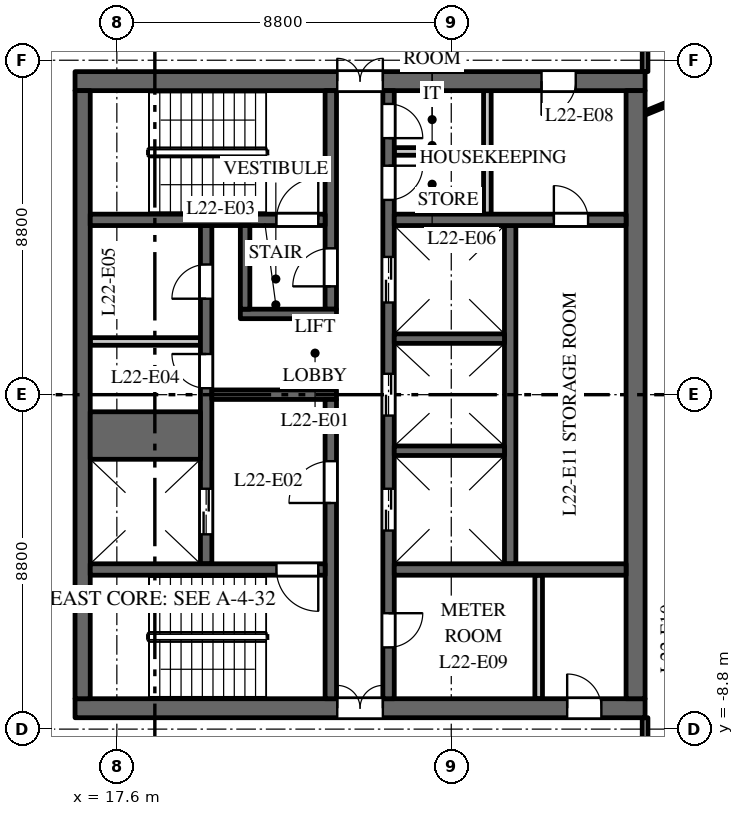
"""IFC4 building model, lengths in metres.
Left out: names, types, materials, properties, quantities, classifications, styles, units other than length and angle.
Written with IfcOpenShell. Run it as: python <this file> out.ifc"""

import sys

from ifc_helpers import new_model, si_unit, direction, frame, frame_2d, origin, place, context, subcontext, project, spatial, rectangle, extrude, element, fill, save


model = new_model("IFC4")
c1 = context("Model", 3, precision=1e-05, world=origin(), true_north=direction((0.0, 1.0)))
c2 = subcontext(c1, "Body", "Model", "MODEL_VIEW")
j1 = project(units=[si_unit("LENGTHUNIT", "METRE"), si_unit("PLANEANGLEUNIT", "RADIAN")], contexts=[c1])
p1 = place(None, origin())
s1 = spatial("IfcSite", under=j1, at=p1, CompositionType="ELEMENT")
p2 = place(p1, origin())
s2 = spatial("IfcBuilding", under=s1, at=p2, CompositionType="ELEMENT")
p3 = place(p2, frame((0.0, 0.0, 100.0)))
s3 = spatial("IfcBuildingStorey", under=s2, at=p3, CompositionType="ELEMENT", Elevation=100.0)
p4 = place(p3, frame((16.5, 8.25, 0.0), z_axis=(0.0, 0.0, 1.0), x_axis=(1.0, 0.0, 0.0)))
e1 = element("IfcWall", 1, at=p4, inside=s3, PredefinedType="SHEAR", context=c2, shape_type="SweptSolid", body=[
    extrude(rectangle(XDim=15.0, YDim=0.5, at=frame_2d((7.5, 0.0))), origin(), (0.0, 0.0, 1.0), 3.7),
])
p5 = place(p4, frame((6.9, 0.0, 0.0)))
e2 = element("IfcOpeningElement", 2, at=p5, cuts=e1, PredefinedType="OPENING", context=c2, shape_type="SweptSolid", body=[
    extrude(rectangle(XDim=1.2, YDim=2.1, at=frame_2d((0.6, 1.05))), frame((0.0, 0.26, 0.0), z_axis=(0.0, -1.0, 0.0), x_axis=(1.0, 0.0, 0.0)), (0.0, 0.0, 1.0), 0.52),
])
p6 = place(p4, frame((12.275, 0.0, 0.0)))
e3 = element("IfcOpeningElement", 3, at=p6, cuts=e1, PredefinedType="OPENING", context=c2, shape_type="SweptSolid", body=[
    extrude(rectangle(XDim=0.9, YDim=2.1, at=frame_2d((0.45, 1.05))), frame((0.0, 0.26, 0.0), z_axis=(0.0, -1.0, 0.0), x_axis=(1.0, 0.0, 0.0)), (0.0, 0.0, 1.0), 0.52),
])
p7 = place(p3, frame((16.5, -8.25, 0.0), z_axis=(0.0, 0.0, 1.0), x_axis=(1.0, 0.0, 0.0)))
e4 = element("IfcWall", 4, at=p7, inside=s3, PredefinedType="SHEAR", context=c2, shape_type="SweptSolid", body=[
    extrude(rectangle(XDim=15.0, YDim=0.5, at=frame_2d((7.5, 0.0))), origin(), (0.0, 0.0, 1.0), 3.7),
])
p8 = place(p7, frame((6.9, 0.0, 0.0)))
e5 = element("IfcOpeningElement", 5, at=p8, cuts=e4, PredefinedType="OPENING", context=c2, shape_type="SweptSolid", body=[
    extrude(rectangle(XDim=1.2, YDim=2.1, at=frame_2d((0.6, 1.05))), frame((0.0, 0.26, 0.0), z_axis=(0.0, -1.0, 0.0), x_axis=(1.0, 0.0, 0.0)), (0.0, 0.0, 1.0), 0.52),
])
p9 = place(p7, frame((12.95, 0.0, 0.0)))
e6 = element("IfcOpeningElement", 6, at=p9, cuts=e4, PredefinedType="OPENING", context=c2, shape_type="SweptSolid", body=[
    extrude(rectangle(XDim=0.9, YDim=2.1, at=frame_2d((0.45, 1.05))), frame((0.0, 0.26, 0.0), z_axis=(0.0, -1.0, 0.0), x_axis=(1.0, 0.0, 0.0)), (0.0, 0.0, 1.0), 0.52),
])
p10 = place(p3, frame((16.9, 1.4, 0.0), z_axis=(0.0, 0.0, 1.0), x_axis=(1.0, 0.0, 0.0)))
e7 = element("IfcWall", 7, at=p10, inside=s3, PredefinedType="PARTITIONING", context=c2, shape_type="SweptSolid", body=[
    extrude(rectangle(XDim=2.9, YDim=0.2, at=frame_2d((1.45, 0.0))), origin(), (0.0, 0.0, 1.0), 3.7),
])
p11 = place(p3, frame((27.95, -4.45, 0.0), z_axis=(0.0, 0.0, 1.0), x_axis=(0.0, 1.0, 0.0)))
e8 = element("IfcWall", 8, at=p11, inside=s3, PredefinedType="SHEAR", context=c2, shape_type="SweptSolid", body=[
    extrude(rectangle(XDim=8.9, YDim=0.3, at=frame_2d((4.45, 0.0))), origin(), (0.0, 0.0, 1.0), 3.7),
])
p12 = place(p3, frame((19.95, -4.45, 0.0), z_axis=(0.0, 0.0, 1.0), x_axis=(0.0, 1.0, 0.0)))
e9 = element("IfcWall", 9, at=p12, inside=s3, PredefinedType="SHEAR", context=c2, shape_type="SweptSolid", body=[
    extrude(rectangle(XDim=8.9, YDim=0.3, at=frame_2d((4.45, 0.0))), origin(), (0.0, 0.0, 1.0), 3.7),
])
p13 = place(p12, frame((0.775, 0.0, 0.0)))
e10 = element("IfcOpeningElement", 10, at=p13, cuts=e9, PredefinedType="OPENING", context=c2, shape_type="SweptSolid", body=[
    extrude(rectangle(XDim=1.2, YDim=2.1, at=frame_2d((0.6, 1.05))), frame((0.0, 0.16, 0.0), z_axis=(0.0, -1.0, 0.0), x_axis=(1.0, 0.0, 0.0)), (0.0, 0.0, 1.0), 0.32),
])
p14 = place(p12, frame((4.62, 0.0, 0.0)))
e11 = element("IfcOpeningElement", 11, at=p14, cuts=e9, PredefinedType="OPENING", context=c2, shape_type="SweptSolid", body=[
    extrude(rectangle(XDim=0.9, YDim=2.1, at=frame_2d((0.45, 1.05))), frame((0.0, 0.16, 0.0), z_axis=(0.0, -1.0, 0.0), x_axis=(1.0, 0.0, 0.0)), (0.0, 0.0, 1.0), 0.32),
])
p15 = place(p12, frame((6.975, 0.0, 0.0)))
e12 = element("IfcOpeningElement", 12, at=p15, cuts=e9, PredefinedType="OPENING", context=c2, shape_type="SweptSolid", body=[
    extrude(rectangle(XDim=0.9, YDim=2.1, at=frame_2d((0.45, 1.05))), frame((0.0, 0.16, 0.0), z_axis=(0.0, -1.0, 0.0), x_axis=(1.0, 0.0, 0.0)), (0.0, 0.0, 1.0), 0.32),
])
p16 = place(p3, frame((24.75, -8.0, 0.0), z_axis=(0.0, 0.0, 1.0), x_axis=(0.0, 1.0, 0.0)))
e13 = element("IfcWall", 13, at=p16, inside=s3, PredefinedType="SHEAR", context=c2, shape_type="SweptSolid", body=[
    extrude(rectangle(XDim=16.0, YDim=0.3, at=frame_2d((8.0, 0.0))), origin(), (0.0, 0.0, 1.0), 3.7),
])
p17 = place(p16, frame((4.425, 0.0, 0.0)))
e14 = element("IfcOpeningElement", 14, at=p17, cuts=e13, PredefinedType="OPENING", context=c2, shape_type="SweptSolid", body=[
    extrude(rectangle(XDim=1.1, YDim=2.1, at=frame_2d((0.55, 1.05))), frame((0.0, 0.16, 0.0), z_axis=(0.0, -1.0, 0.0), x_axis=(1.0, 0.0, 0.0)), (0.0, 0.0, 1.0), 0.32),
])
p18 = place(p16, frame((7.45, 0.0, 0.0)))
e15 = element("IfcOpeningElement", 15, at=p18, cuts=e13, PredefinedType="OPENING", context=c2, shape_type="SweptSolid", body=[
    extrude(rectangle(XDim=1.1, YDim=2.1, at=frame_2d((0.55, 1.05))), frame((0.0, 0.16, 0.0), z_axis=(0.0, -1.0, 0.0), x_axis=(1.0, 0.0, 0.0)), (0.0, 0.0, 1.0), 0.32),
])
p19 = place(p16, frame((10.425, 0.0, 0.0)))
e16 = element("IfcOpeningElement", 16, at=p19, cuts=e13, PredefinedType="OPENING", context=c2, shape_type="SweptSolid", body=[
    extrude(rectangle(XDim=1.2, YDim=2.1, at=frame_2d((0.6, 1.05))), frame((0.0, 0.16, 0.0), z_axis=(0.0, -1.0, 0.0), x_axis=(1.0, 0.0, 0.0)), (0.0, 0.0, 1.0), 0.32),
])
p20 = place(p16, frame((13.125, 0.0, 0.0)))
e17 = element("IfcOpeningElement", 17, at=p20, cuts=e13, PredefinedType="OPENING", context=c2, shape_type="SweptSolid", body=[
    extrude(rectangle(XDim=0.9, YDim=2.1, at=frame_2d((0.45, 1.05))), frame((0.0, 0.16, 0.0), z_axis=(0.0, -1.0, 0.0), x_axis=(1.0, 0.0, 0.0)), (0.0, 0.0, 1.0), 0.32),
])
p21 = place(p16, frame((14.75, 0.0, 0.0)))
e18 = element("IfcOpeningElement", 18, at=p21, cuts=e13, PredefinedType="OPENING", context=c2, shape_type="SweptSolid", body=[
    extrude(rectangle(XDim=0.9, YDim=2.1, at=frame_2d((0.45, 1.05))), frame((0.0, 0.16, 0.0), z_axis=(0.0, -1.0, 0.0), x_axis=(1.0, 0.0, 0.0)), (0.0, 0.0, 1.0), 0.32),
])
p22 = place(p16, frame((1.35, 0.0, 0.0)))
e19 = element("IfcOpeningElement", 19, at=p22, cuts=e13, PredefinedType="OPENING", context=c2, shape_type="SweptSolid", body=[
    extrude(rectangle(XDim=0.9, YDim=2.1, at=frame_2d((0.45, 1.05))), frame((0.0, 0.16, 0.0), z_axis=(0.0, -1.0, 0.0), x_axis=(1.0, 0.0, 0.0)), (0.0, 0.0, 1.0), 0.32),
])
p23 = place(p3, frame((20.1, 0.0, 0.0), z_axis=(0.0, 0.0, 1.0), x_axis=(1.0, 0.0, 0.0)))
e20 = element("IfcWall", 20, at=p23, inside=s3, PredefinedType="SHEAR", context=c2, shape_type="SweptSolid", body=[
    extrude(rectangle(XDim=3.28, YDim=0.25, at=frame_2d((1.64, 0.0))), origin(), (0.0, 0.0, 1.0), 3.7),
])
p24 = place(p3, frame((16.7, -8.0, 0.0), z_axis=(0.0, 0.0, 1.0), x_axis=(0.0, 1.0, 0.0)))
e21 = element("IfcWall", 21, at=p24, inside=s3, PredefinedType="SHEAR", context=c2, shape_type="SweptSolid", body=[
    extrude(rectangle(XDim=16.0, YDim=0.4, at=frame_2d((8.0, 0.0))), origin(), (0.0, 0.0, 1.0), 3.7),
])
p25 = place(p3, frame((31.25, -8.0, 0.0), z_axis=(0.0, 0.0, 1.0), x_axis=(0.0, 1.0, 0.0)))
e22 = element("IfcWall", 22, at=p25, inside=s3, PredefinedType="SHEAR", context=c2, shape_type="SweptSolid", body=[
    extrude(rectangle(XDim=16.0, YDim=0.5, at=frame_2d((8.0, 0.0))), origin(), (0.0, 0.0, 1.0), 3.7),
])
p26 = place(p3, frame((24.9, 4.6, 0.0), z_axis=(0.0, 0.0, 1.0), x_axis=(1.0, 0.0, 0.0)))
e23 = element("IfcWall", 23, at=p26, inside=s3, PredefinedType="SHEAR", context=c2, shape_type="SweptSolid", body=[
    extrude(rectangle(XDim=6.1, YDim=0.3, at=frame_2d((3.05, 0.0))), origin(), (0.0, 0.0, 1.0), 3.7),
])
p27 = place(p26, frame((4.2, 0.0, 0.0)))
e24 = element("IfcOpeningElement", 24, at=p27, cuts=e23, PredefinedType="OPENING", context=c2, shape_type="SweptSolid", body=[
    extrude(rectangle(XDim=0.9, YDim=2.1, at=frame_2d((0.45, 1.05))), frame((0.0, 0.16, 0.0), z_axis=(0.0, -1.0, 0.0), x_axis=(1.0, 0.0, 0.0)), (0.0, 0.0, 1.0), 0.32),
])
for number, where, z_axis, x_axis in (
    (25, (27.35, 4.75, 0.0), (0.0, 0.0, 1.0), (0.0, 1.0, 0.0)),
    (26, (28.7, -8.0, 0.0), (0.0, 0.0, 1.0), (0.0, 1.0, 0.0)),
):
    element("IfcWall", number, at=place(p3, frame(where, z_axis=z_axis, x_axis=x_axis)), inside=s3, PredefinedType="PARTITIONING", context=c2, shape_type="SweptSolid", body=[
        extrude(rectangle(XDim=3.25, YDim=0.2, at=frame_2d((1.625, 0.0))), origin(), (0.0, 0.0, 1.0), 3.7),
    ])
p28 = place(p3, frame((24.9, 6.4, 0.0), z_axis=(0.0, 0.0, 1.0), x_axis=(1.0, 0.0, 0.0)))
e27 = element("IfcWall", 27, at=p28, inside=s3, PredefinedType="PARTITIONING", context=c2, shape_type="SweptSolid", body=[
    extrude(rectangle(XDim=2.35, YDim=0.2, at=frame_2d((1.175, 0.0))), origin(), (0.0, 0.0, 1.0), 3.7),
])
p29 = place(p3, frame((24.9, -4.6, 0.0), z_axis=(0.0, 0.0, 1.0), x_axis=(1.0, 0.0, 0.0)))
e28 = element("IfcWall", 28, at=p29, inside=s3, PredefinedType="SHEAR", context=c2, shape_type="SweptSolid", body=[
    extrude(rectangle(XDim=6.1, YDim=0.3, at=frame_2d((3.05, 0.0))), origin(), (0.0, 0.0, 1.0), 3.7),
])
p30 = place(p3, frame((16.9, -1.075, 0.0), z_axis=(0.0, 0.0, 1.0), x_axis=(1.0, 0.0, 0.0)))
e29 = element("IfcWall", 29, at=p30, inside=s3, PredefinedType="SHEAR", context=c2, shape_type="SweptSolid", body=[
    extrude(rectangle(XDim=2.9, YDim=1.25, at=frame_2d((1.45, 0.0))), origin(), (0.0, 0.0, 1.0), 3.7),
])
for number, where, z_axis, x_axis in (
    (30, (24.9, -1.475, 0.0), (0.0, 0.0, 1.0), (1.0, 0.0, 0.0)),
    (31, (24.9, 1.475, 0.0), (0.0, 0.0, 1.0), (1.0, 0.0, 0.0)),
):
    element("IfcWall", number, at=place(p3, frame(where, z_axis=z_axis, x_axis=x_axis)), inside=s3, PredefinedType="SHEAR", context=c2, shape_type="SweptSolid", body=[
        extrude(rectangle(XDim=2.9, YDim=0.25, at=frame_2d((1.45, 0.0))), origin(), (0.0, 0.0, 1.0), 3.7),
    ])
p31 = place(p3, frame((23.23, 2.25, 0.0), z_axis=(0.0, 0.0, 1.0), x_axis=(0.0, 1.0, 0.0)))
e32 = element("IfcWall", 32, at=p31, inside=s3, PredefinedType="SHEAR", context=c2, shape_type="SweptSolid", body=[
    extrude(rectangle(XDim=5.75, YDim=0.3, at=frame_2d((2.875, 0.0))), origin(), (0.0, 0.0, 1.0), 3.7),
])
p32 = place(p31, frame((0.6, 0.0, 0.0)))
e33 = element("IfcOpeningElement", 33, at=p32, cuts=e32, PredefinedType="OPENING", context=c2, shape_type="SweptSolid", body=[
    extrude(rectangle(XDim=1.0, YDim=2.1, at=frame_2d((0.5, 1.05))), frame((0.0, 0.16, 0.0), z_axis=(0.0, -1.0, 0.0), x_axis=(1.0, 0.0, 0.0)), (0.0, 0.0, 1.0), 0.32),
])
p33 = place(p3, frame((23.23, -8.0, 0.0), z_axis=(0.0, 0.0, 1.0), x_axis=(0.0, 1.0, 0.0)))
e34 = element("IfcWall", 34, at=p33, inside=s3, PredefinedType="SHEAR", context=c2, shape_type="SweptSolid", body=[
    extrude(rectangle(XDim=7.875, YDim=0.3, at=frame_2d((3.938, 0.0))), origin(), (0.0, 0.0, 1.0), 3.7),
])
p34 = place(p33, frame((5.15, 0.0, 0.0)))
e35 = element("IfcOpeningElement", 35, at=p34, cuts=e34, PredefinedType="OPENING", context=c2, shape_type="SweptSolid", body=[
    extrude(rectangle(XDim=1.1, YDim=2.1, at=frame_2d((0.55, 1.05))), frame((0.0, 0.16, 0.0), z_axis=(0.0, -1.0, 0.0), x_axis=(1.0, 0.0, 0.0)), (0.0, 0.0, 1.0), 0.32),
])
p35 = place(p3, frame((16.9, 4.6, 0.0), z_axis=(0.0, 0.0, 1.0), x_axis=(1.0, 0.0, 0.0)))
e36 = element("IfcWall", 36, at=p35, inside=s3, PredefinedType="SHEAR", context=c2, shape_type="SweptSolid", body=[
    extrude(rectangle(XDim=6.18, YDim=0.3, at=frame_2d((3.09, 0.0))), origin(), (0.0, 0.0, 1.0), 3.7),
])
p36 = place(p35, frame((4.9, 0.0, 0.0)))
e37 = element("IfcOpeningElement", 37, at=p36, cuts=e36, PredefinedType="OPENING", context=c2, shape_type="SweptSolid", body=[
    extrude(rectangle(XDim=1.1, YDim=2.1, at=frame_2d((0.55, 1.05))), frame((0.0, 0.16, 0.0), z_axis=(0.0, -1.0, 0.0), x_axis=(1.0, 0.0, 0.0)), (0.0, 0.0, 1.0), 0.32),
])
p37 = place(p3, frame((16.9, -4.6, 0.0), z_axis=(0.0, 0.0, 1.0), x_axis=(1.0, 0.0, 0.0)))
e38 = element("IfcWall", 38, at=p37, inside=s3, PredefinedType="SHEAR", context=c2, shape_type="SweptSolid", body=[
    extrude(rectangle(XDim=6.18, YDim=0.3, at=frame_2d((3.09, 0.0))), origin(), (0.0, 0.0, 1.0), 3.7),
])
p38 = place(p37, frame((4.9, 0.0, 0.0)))
e39 = element("IfcOpeningElement", 39, at=p38, cuts=e38, PredefinedType="OPENING", context=c2, shape_type="SweptSolid", body=[
    extrude(rectangle(XDim=1.1, YDim=2.1, at=frame_2d((0.55, 1.05))), frame((0.0, 0.16, 0.0), z_axis=(0.0, -1.0, 0.0), x_axis=(1.0, 0.0, 0.0)), (0.0, 0.0, 1.0), 0.32),
])
p39 = place(p3, frame((20.85, 2.125, 0.0), z_axis=(0.0, 0.0, 1.0), x_axis=(1.0, 0.0, 0.0)))
e40 = element("IfcWall", 40, at=p39, inside=s3, PredefinedType="SHEAR", context=c2, shape_type="SweptSolid", body=[
    extrude(rectangle(XDim=2.53, YDim=0.25, at=frame_2d((1.265, 0.0))), origin(), (0.0, 0.0, 1.0), 3.7),
])
p40 = place(p3, frame((20.975, 2.25, 0.0), z_axis=(0.0, 0.0, 1.0), x_axis=(0.0, 1.0, 0.0)))
e41 = element("IfcWall", 41, at=p40, inside=s3, PredefinedType="SHEAR", context=c2, shape_type="SweptSolid", body=[
    extrude(rectangle(XDim=2.2, YDim=0.25, at=frame_2d((1.1, 0.0))), origin(), (0.0, 0.0, 1.0), 3.7),
])
p41 = place(p3, frame((31.5, -10.7, 0.0), z_axis=(0.0, 0.0, 1.0), x_axis=(0.0, 1.0, 0.0)))
e42 = element("IfcWall", 42, at=p41, inside=s3, PredefinedType="PARTITIONING", context=c2, shape_type="SweptSolid", body=[
    extrude(rectangle(XDim=2.2, YDim=0.15, at=frame_2d((1.1, 0.0))), origin(), (0.0, 0.0, 1.0), 2.9),
])
p42 = place(p3, frame((31.5, 7.41, 0.0), z_axis=(0.0, 0.0, 1.0), x_axis=(0.925344112436, 0.379128307542, 0.0)))
e43 = element("IfcWall", 43, at=p42, inside=s3, PredefinedType="PARTITIONING", context=c2, shape_type="SweptSolid", body=[
    extrude(rectangle(XDim=2.954, YDim=0.1, at=frame_2d((1.477, 0.0))), origin(), (0.0, 0.0, 1.0), 3.7),
])
p43 = place(p3, frame((31.5, 8.5, 0.0), z_axis=(0.0, 0.0, 1.0), x_axis=(0.0, 1.0, 0.0)))
e44 = element("IfcWall", 44, at=p43, inside=s3, PredefinedType="PARTITIONING", context=c2, shape_type="SweptSolid", body=[
    extrude(rectangle(XDim=2.2, YDim=0.15, at=frame_2d((1.1, 0.0))), origin(), (0.0, 0.0, 1.0), 2.9),
])
p44 = place(p13, origin())
e45 = element("IfcDoor", 45, at=p44, inside=s3, OperationType="DOUBLE_DOOR_SLIDING", PredefinedType="DOOR", context=c2, shape_type="SweptSolid", body=[
    extrude(rectangle(XDim=1.2, YDim=2.1, at=frame_2d((0.6, 1.05))), frame((0.0, 0.025, 0.0), z_axis=(0.0, -1.0, 0.0), x_axis=(1.0, 0.0, 0.0)), (0.0, 0.0, 1.0), 0.05),
])
fill(e10, e45)
p45 = place(p17, origin())
e46 = element("IfcDoor", 46, at=p45, inside=s3, OperationType="DOUBLE_DOOR_SLIDING", PredefinedType="DOOR", context=c2, shape_type="SweptSolid", body=[
    extrude(rectangle(XDim=1.1, YDim=2.1, at=frame_2d((0.55, 1.05))), frame((0.0, 0.025, 0.0), z_axis=(0.0, -1.0, 0.0), x_axis=(1.0, 0.0, 0.0)), (0.0, 0.0, 1.0), 0.05),
])
fill(e14, e46)
p46 = place(p18, origin())
e47 = element("IfcDoor", 47, at=p46, inside=s3, OperationType="DOUBLE_DOOR_SLIDING", PredefinedType="DOOR", context=c2, shape_type="SweptSolid", body=[
    extrude(rectangle(XDim=1.1, YDim=2.1, at=frame_2d((0.55, 1.05))), frame((0.0, 0.025, 0.0), z_axis=(0.0, -1.0, 0.0), x_axis=(1.0, 0.0, 0.0)), (0.0, 0.0, 1.0), 0.05),
])
fill(e15, e47)
p47 = place(p19, origin())
e48 = element("IfcDoor", 48, at=p47, inside=s3, OperationType="DOUBLE_DOOR_SLIDING", PredefinedType="DOOR", context=c2, shape_type="SweptSolid", body=[
    extrude(rectangle(XDim=1.2, YDim=2.1, at=frame_2d((0.6, 1.05))), frame((0.0, 0.025, 0.0), z_axis=(0.0, -1.0, 0.0), x_axis=(1.0, 0.0, 0.0)), (0.0, 0.0, 1.0), 0.05),
])
fill(e16, e48)
p48 = place(p36, origin())
e49 = element("IfcDoor", 49, at=p48, inside=s3, OperationType="SINGLE_SWING_LEFT", PredefinedType="DOOR", context=c2, shape_type="SweptSolid", body=[
    extrude(rectangle(XDim=1.1, YDim=2.1, at=frame_2d((0.55, 1.05))), frame((0.0, 0.025, 0.0), z_axis=(0.0, -1.0, 0.0), x_axis=(1.0, 0.0, 0.0)), (0.0, 0.0, 1.0), 0.05),
])
fill(e37, e49)
p49 = place(p38, origin())
e50 = element("IfcDoor", 50, at=p49, inside=s3, OperationType="SINGLE_SWING_RIGHT", PredefinedType="DOOR", context=c2, shape_type="SweptSolid", body=[
    extrude(rectangle(XDim=1.1, YDim=2.1, at=frame_2d((0.55, 1.05))), frame((0.0, 0.025, 0.0), z_axis=(0.0, -1.0, 0.0), x_axis=(1.0, 0.0, 0.0)), (0.0, 0.0, 1.0), 0.05),
])
fill(e39, e50)
p50 = place(p34, origin())
e51 = element("IfcDoor", 51, at=p50, inside=s3, OperationType="SINGLE_SWING_RIGHT", PredefinedType="DOOR", context=c2, shape_type="SweptSolid", body=[
    extrude(rectangle(XDim=1.1, YDim=2.1, at=frame_2d((0.55, 1.05))), frame((0.0, 0.025, 0.0), z_axis=(0.0, -1.0, 0.0), x_axis=(1.0, 0.0, 0.0)), (0.0, 0.0, 1.0), 0.05),
])
fill(e35, e51)
p51 = place(p32, origin())
e52 = element("IfcDoor", 52, at=p51, inside=s3, OperationType="SINGLE_SWING_RIGHT", PredefinedType="DOOR", context=c2, shape_type="SweptSolid", body=[
    extrude(rectangle(XDim=1.0, YDim=2.1, at=frame_2d((0.5, 1.05))), frame((0.0, 0.025, 0.0), z_axis=(0.0, -1.0, 0.0), x_axis=(1.0, 0.0, 0.0)), (0.0, 0.0, 1.0), 0.05),
])
fill(e33, e52)
p52 = place(p5, origin())
e53 = element("IfcDoor", 53, at=p52, inside=s3, OperationType="DOUBLE_DOOR_DOUBLE_SWING", PredefinedType="DOOR", context=c2, shape_type="SweptSolid", body=[
    extrude(rectangle(XDim=1.2, YDim=2.1, at=frame_2d((0.6, 1.05))), frame((0.0, 0.025, 0.0), z_axis=(0.0, -1.0, 0.0), x_axis=(1.0, 0.0, 0.0)), (0.0, 0.0, 1.0), 0.05),
])
fill(e2, e53)
p53 = place(p8, origin())
e54 = element("IfcDoor", 54, at=p53, inside=s3, OperationType="DOUBLE_DOOR_DOUBLE_SWING", PredefinedType="DOOR", context=c2, shape_type="SweptSolid", body=[
    extrude(rectangle(XDim=1.2, YDim=2.1, at=frame_2d((0.6, 1.05))), frame((0.0, 0.025, 0.0), z_axis=(0.0, -1.0, 0.0), x_axis=(1.0, 0.0, 0.0)), (0.0, 0.0, 1.0), 0.05),
])
fill(e5, e54)
p54 = place(p14, origin())
e55 = element("IfcDoor", 55, at=p54, inside=s3, OperationType="SINGLE_SWING_LEFT", PredefinedType="DOOR", context=c2, shape_type="SweptSolid", body=[
    extrude(rectangle(XDim=0.9, YDim=2.1, at=frame_2d((0.45, 1.05))), frame((0.0, 0.025, 0.0), z_axis=(0.0, -1.0, 0.0), x_axis=(1.0, 0.0, 0.0)), (0.0, 0.0, 1.0), 0.05),
])
fill(e11, e55)
p55 = place(p15, origin())
e56 = element("IfcDoor", 56, at=p55, inside=s3, OperationType="SINGLE_SWING_RIGHT", PredefinedType="DOOR", context=c2, shape_type="SweptSolid", body=[
    extrude(rectangle(XDim=0.9, YDim=2.1, at=frame_2d((0.45, 1.05))), frame((0.0, 0.025, 0.0), z_axis=(0.0, -1.0, 0.0), x_axis=(1.0, 0.0, 0.0)), (0.0, 0.0, 1.0), 0.05),
])
fill(e12, e56)
p56 = place(p20, origin())
e57 = element("IfcDoor", 57, at=p56, inside=s3, OperationType="SINGLE_SWING_RIGHT", PredefinedType="DOOR", context=c2, shape_type="SweptSolid", body=[
    extrude(rectangle(XDim=0.9, YDim=2.1, at=frame_2d((0.45, 1.05))), frame((0.0, 0.025, 0.0), z_axis=(0.0, -1.0, 0.0), x_axis=(1.0, 0.0, 0.0)), (0.0, 0.0, 1.0), 0.05),
])
fill(e17, e57)
p57 = place(p21, origin())
e58 = element("IfcDoor", 58, at=p57, inside=s3, OperationType="SINGLE_SWING_LEFT", PredefinedType="DOOR", context=c2, shape_type="SweptSolid", body=[
    extrude(rectangle(XDim=0.9, YDim=2.1, at=frame_2d((0.45, 1.05))), frame((0.0, 0.025, 0.0), z_axis=(0.0, -1.0, 0.0), x_axis=(1.0, 0.0, 0.0)), (0.0, 0.0, 1.0), 0.05),
])
fill(e18, e58)
p58 = place(p6, origin())
e59 = element("IfcDoor", 59, at=p58, inside=s3, OperationType="SINGLE_SWING_LEFT", PredefinedType="DOOR", context=c2, shape_type="SweptSolid", body=[
    extrude(rectangle(XDim=0.9, YDim=2.1, at=frame_2d((0.45, 1.05))), frame((0.0, 0.025, 0.0), z_axis=(0.0, -1.0, 0.0), x_axis=(1.0, 0.0, 0.0)), (0.0, 0.0, 1.0), 0.05),
])
fill(e3, e59)
p59 = place(p22, origin())
e60 = element("IfcDoor", 60, at=p59, inside=s3, OperationType="SINGLE_SWING_RIGHT", PredefinedType="DOOR", context=c2, shape_type="SweptSolid", body=[
    extrude(rectangle(XDim=0.9, YDim=2.1, at=frame_2d((0.45, 1.05))), frame((0.0, 0.025, 0.0), z_axis=(0.0, -1.0, 0.0), x_axis=(1.0, 0.0, 0.0)), (0.0, 0.0, 1.0), 0.05),
])
fill(e19, e60)
p60 = place(p9, origin())
e61 = element("IfcDoor", 61, at=p60, inside=s3, OperationType="SINGLE_SWING_RIGHT", PredefinedType="DOOR", context=c2, shape_type="SweptSolid", body=[
    extrude(rectangle(XDim=0.9, YDim=2.1, at=frame_2d((0.45, 1.05))), frame((0.0, 0.025, 0.0), z_axis=(0.0, -1.0, 0.0), x_axis=(1.0, 0.0, 0.0)), (0.0, 0.0, 1.0), 0.05),
])
fill(e6, e61)
p61 = place(p27, origin())
e62 = element("IfcDoor", 62, at=p61, inside=s3, OperationType="SINGLE_SWING_RIGHT", PredefinedType="DOOR", context=c2, shape_type="SweptSolid", body=[
    extrude(rectangle(XDim=0.9, YDim=2.1, at=frame_2d((0.45, 1.05))), frame((0.0, 0.025, 0.0), z_axis=(0.0, -1.0, 0.0), x_axis=(1.0, 0.0, 0.0)), (0.0, 0.0, 1.0), 0.05),
])
fill(e24, e62)
save(model, sys.argv[1])
